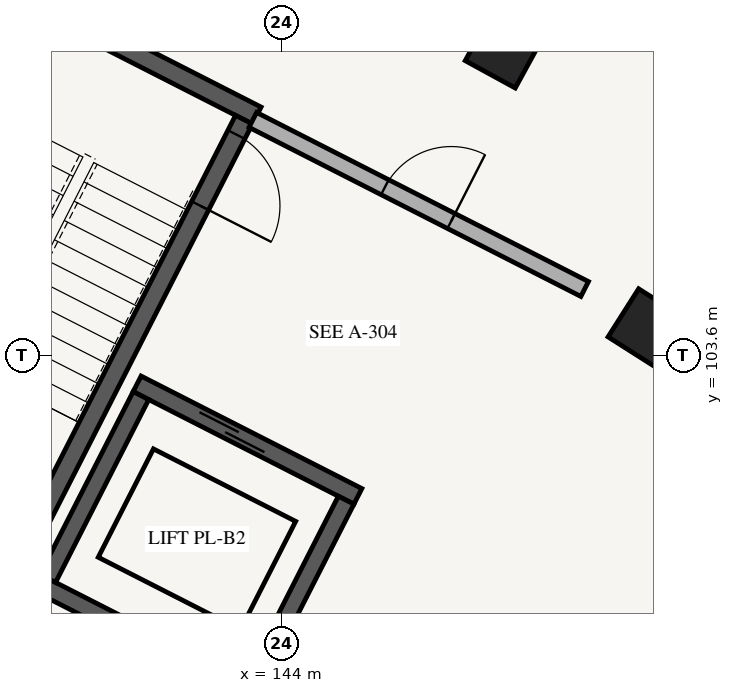
"""IFC4 building model, lengths in metres.
Left out: names, types, materials, properties, quantities, classifications, styles, units other than length and angle.
Written with IfcOpenShell. Run it as: python <this file> out.ifc"""

import sys

from ifc_helpers import new_model, si_unit, direction, frame, frame_2d, origin, origin_2d, place, context, subcontext, project, spatial, rectangle, extrude, element, fill, save


model = new_model("IFC4")
c1 = context("Model", 3, precision=1e-05, world=origin(), true_north=direction((0.0, 1.0)))
c2 = subcontext(c1, "Body", "Model", "MODEL_VIEW")
j1 = project(units=[si_unit("LENGTHUNIT", "METRE"), si_unit("PLANEANGLEUNIT", "RADIAN")], contexts=[c1])
p1 = place(None, origin())
s1 = spatial("IfcSite", under=j1, at=p1, CompositionType="ELEMENT")
p2 = place(p1, origin())
s2 = spatial("IfcBuilding", under=s1, at=p2, CompositionType="ELEMENT")
p3 = place(p2, frame((0.0, 0.0, -4.2)))
s3 = spatial("IfcBuildingStorey", under=s2, at=p3, CompositionType="ELEMENT", Elevation=-4.2)
p4 = place(p3, frame((140.629, 108.307, 0.0), z_axis=(0.0, 0.0, 1.0), x_axis=(0.891032414707, -0.453939683153, 0.0)))
e1 = element("IfcWall", 1, at=p4, inside=s3, PredefinedType="SHEAR", context=c2, shape_type="SweptSolid", body=[
    extrude(rectangle(XDim=3.42, YDim=0.25, at=frame_2d((1.71, 0.0))), origin(), (0.0, 0.0, 1.0), 3.92),
])
p5 = place(p3, frame((143.509, 106.699, 0.0), z_axis=(0.0, 0.0, 1.0), x_axis=(-0.453992276384, -0.891005618941, 0.0)))
e2 = element("IfcWall", 2, at=p5, inside=s3, PredefinedType="SHEAR", context=c2, shape_type="SweptSolid", body=[
    extrude(rectangle(XDim=6.6, YDim=0.25, at=frame_2d((3.3, 0.0))), origin(), (0.0, 0.0, 1.0), 3.92),
])
p6 = place(p5, frame((0.22, 0.0, 0.0)))
e3 = element("IfcOpeningElement", 3, at=p6, cuts=e2, PredefinedType="OPENING", context=c2, shape_type="SweptSolid", body=[
    extrude(rectangle(XDim=1.05, YDim=2.15, at=frame_2d((0.525, 1.075))), frame((0.0, 0.135, 0.0), z_axis=(0.0, -1.0, 0.0), x_axis=(1.0, 0.0, 0.0)), (0.0, 0.0, 1.0), 0.27),
])
p7 = place(p3, frame((142.103, 103.224, 0.0), z_axis=(0.0, 0.0, 1.0), x_axis=(0.891001200497, -0.454000947921, 0.0)))
e4 = element("IfcWall", 4, at=p7, inside=s3, PredefinedType="SHEAR", context=c2, shape_type="SweptSolid", body=[
    extrude(rectangle(XDim=3.26, YDim=0.23, at=frame_2d((1.63, 0.0))), origin(), (0.0, 0.0, 1.0), 3.92),
])
p8 = place(p7, frame((0.9, 0.0, 0.0)))
e5 = element("IfcOpeningElement", 5, at=p8, cuts=e4, PredefinedType="OPENING", context=c2, shape_type="SweptSolid", body=[
    extrude(rectangle(XDim=1.0, YDim=2.15, at=frame_2d((0.5, 1.075))), frame((0.0, 0.125, 0.0), z_axis=(0.0, -1.0, 0.0), x_axis=(1.0, 0.0, 0.0)), (0.0, 0.0, 1.0), 0.25),
])
p9 = place(p3, frame((140.772, 100.613, 0.0), z_axis=(0.0, 0.0, 1.0), x_axis=(0.891016635648, -0.453970654337, 0.0)))
e6 = element("IfcWall", 6, at=p9, inside=s3, PredefinedType="SHEAR", context=c2, shape_type="SweptSolid", body=[
    extrude(rectangle(XDim=3.26, YDim=0.23, at=frame_2d((1.63, 0.0))), origin(), (0.0, 0.0, 1.0), 3.92),
])
for number, where, z_axis, x_axis in (
    (7, (142.153, 103.069, 0.0), (0.0, 0.0, 1.0), (-0.454, -0.891, 0.0)),
    (8, (144.853, 101.694, 0.0), (0.0, 0.0, 1.0), (-0.454, -0.891, 0.0)),
):
    element("IfcWall", number, at=place(p3, frame(where, z_axis=z_axis, x_axis=x_axis)), inside=s3, PredefinedType="SHEAR", context=c2, shape_type="SweptSolid", body=[
        extrude(rectangle(XDim=2.7, YDim=0.23, at=frame_2d((1.35, 0.0))), origin(), (0.0, 0.0, 1.0), 3.92),
    ])
for number, where, z_axis, x_axis in (
    (9, (148.817, 103.957, 0.0), (0.0, 0.0, 1.0), (0.536, 0.844, 0.0)),
    (10, (146.928, 107.625, 0.0), (0.0, 0.0, 1.0), (0.48, 0.877, 0.0)),
):
    element("IfcColumn", number, at=place(p3, frame(where, z_axis=z_axis, x_axis=x_axis)), inside=s3, PredefinedType="COLUMN", context=c2, shape_type="SweptSolid", body=[
        extrude(rectangle(XDim=0.75, YDim=0.75, at=origin_2d()), origin(), (0.0, 0.0, 1.0), 3.92),
    ])
p10 = place(p3, frame((143.625, 106.696, 0.0), z_axis=(0.0, 0.0, 1.0), x_axis=(0.891003372311, -0.453996685595, 0.0)))
e11 = element("IfcWall", 11, at=p10, inside=s3, PredefinedType="PARTITIONING", context=c2, shape_type="SweptSolid", body=[
    extrude(rectangle(XDim=4.9, YDim=0.22, at=frame_2d((2.45, 0.0))), origin(), (0.0, 0.0, 1.0), 3.18),
])
p11 = place(p10, frame((1.95, 0.0, 0.0)))
e12 = element("IfcOpeningElement", 12, at=p11, cuts=e11, PredefinedType="OPENING", context=c2, shape_type="SweptSolid", body=[
    extrude(rectangle(XDim=0.98, YDim=2.14, at=frame_2d((0.49, 1.07))), frame((0.0, 0.12, 0.0), z_axis=(0.0, -1.0, 0.0), x_axis=(1.0, 0.0, 0.0)), (0.0, 0.0, 1.0), 0.24),
])
p12 = place(p6, origin())
e13 = element("IfcDoor", 13, at=p12, inside=s3, OperationType="SINGLE_SWING_RIGHT", PredefinedType="DOOR", context=c2, shape_type="SweptSolid", body=[
    extrude(rectangle(XDim=1.05, YDim=2.15, at=frame_2d((0.525, 1.075))), frame((0.0, 0.025, 0.0), z_axis=(0.0, -1.0, 0.0), x_axis=(1.0, 0.0, 0.0)), (0.0, 0.0, 1.0), 0.05),
])
fill(e3, e13)
p13 = place(p8, origin())
e14 = element("IfcDoor", 14, at=p13, inside=s3, OperationType="DOUBLE_DOOR_SLIDING", PredefinedType="DOOR", context=c2, shape_type="SweptSolid", body=[
    extrude(rectangle(XDim=1.0, YDim=2.15, at=frame_2d((0.5, 1.075))), frame((0.0, 0.025, 0.0), z_axis=(0.0, -1.0, 0.0), x_axis=(1.0, 0.0, 0.0)), (0.0, 0.0, 1.0), 0.05),
])
fill(e5, e14)
p14 = place(p11, origin())
e15 = element("IfcDoor", 15, at=p14, inside=s3, OperationType="SINGLE_SWING_RIGHT", PredefinedType="DOOR", context=c2, shape_type="SweptSolid", body=[
    extrude(rectangle(XDim=0.98, YDim=2.14, at=frame_2d((0.49, 1.07))), frame((0.0, 0.025, 0.0), z_axis=(0.0, -1.0, 0.0), x_axis=(1.0, 0.0, 0.0)), (0.0, 0.0, 1.0), 0.05),
])
fill(e12, e15)
save(model, sys.argv[1])
